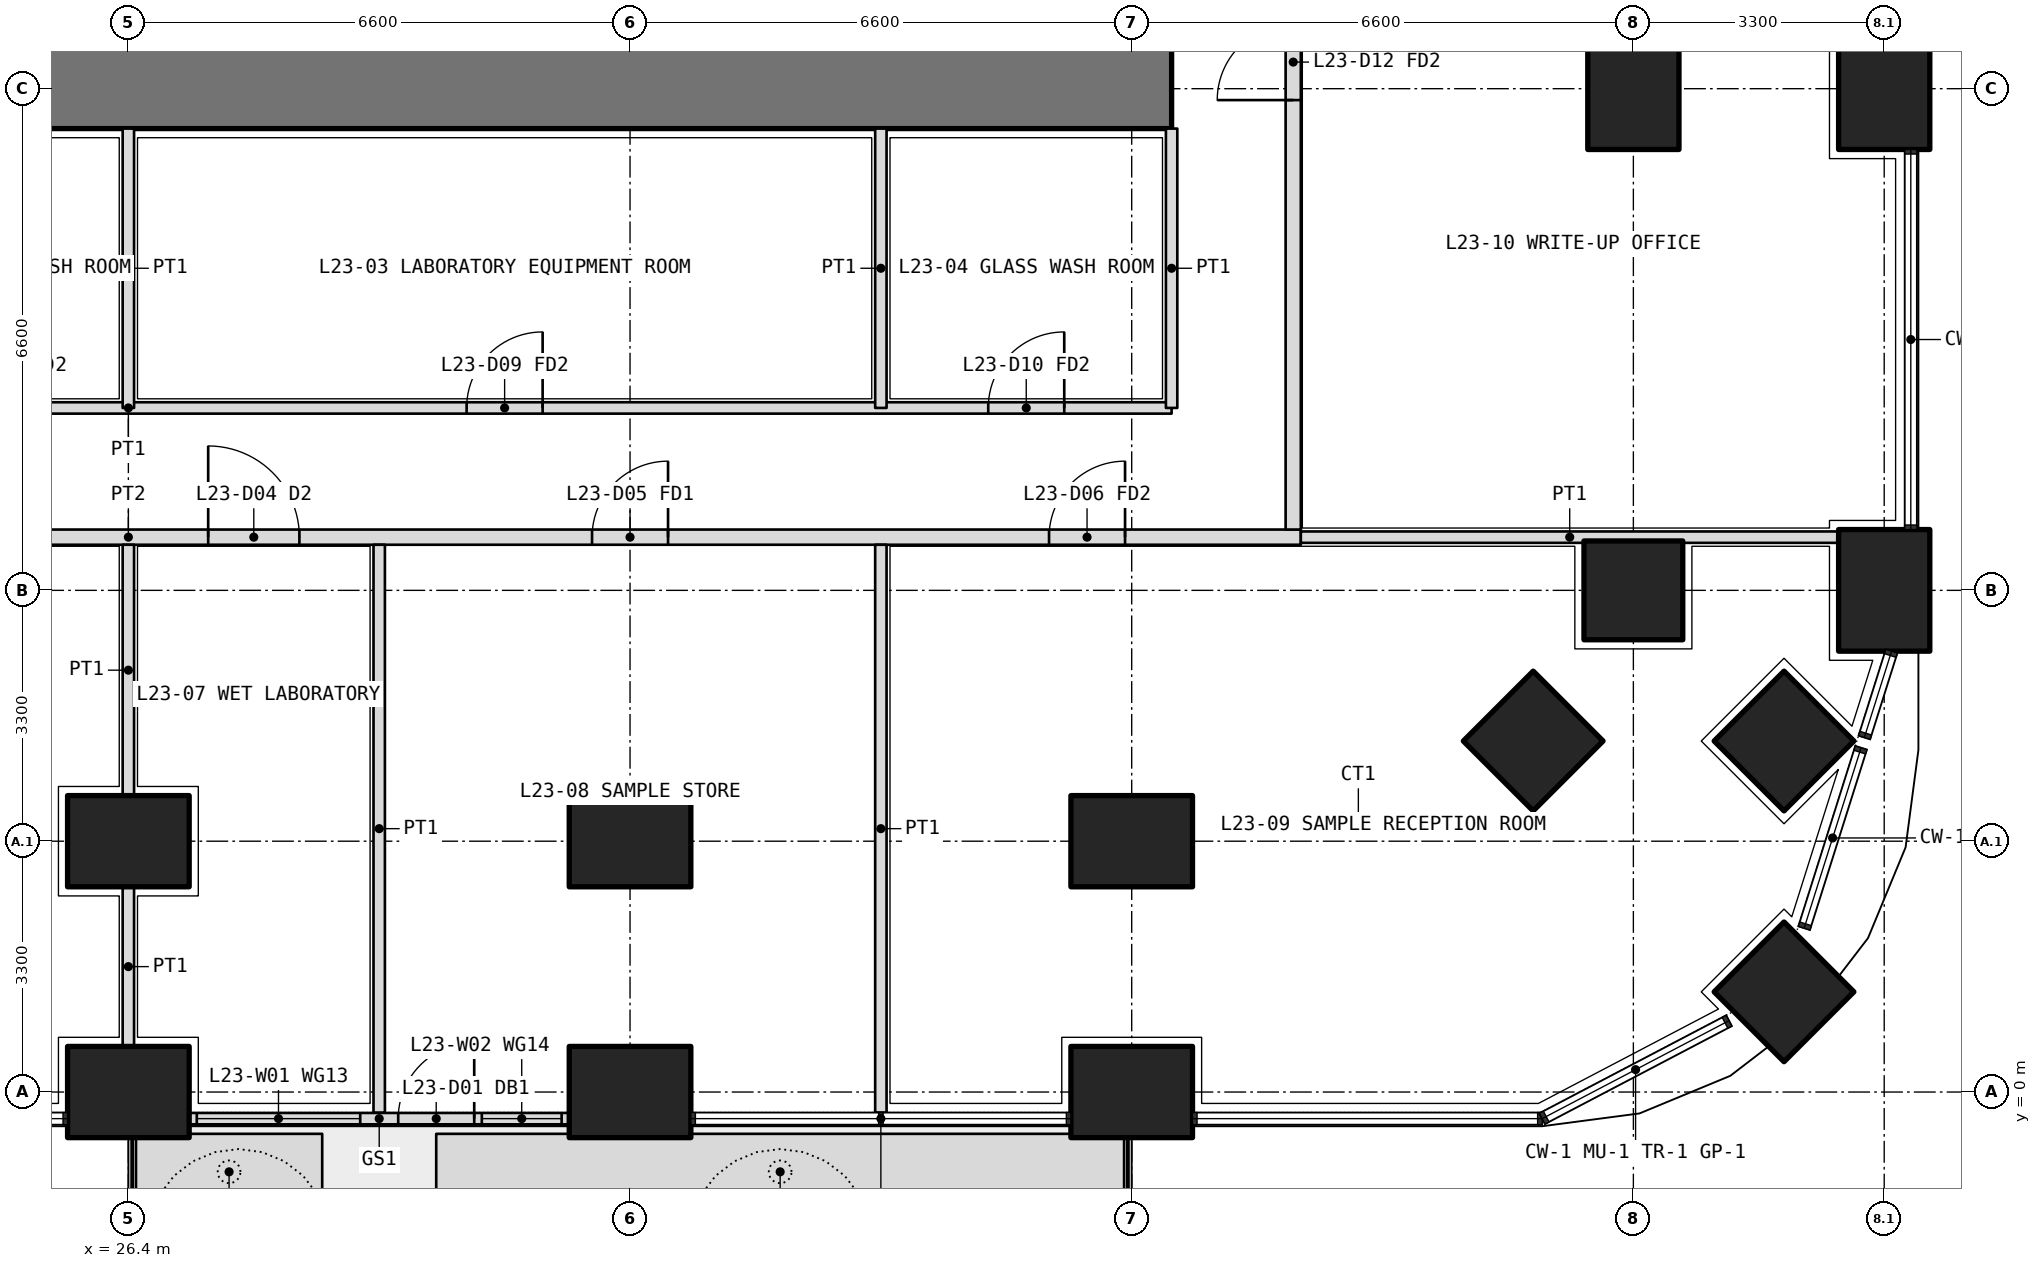
"""IFC4 building model, lengths in metres.
Left out: names, types, materials, properties, quantities, classifications, styles, units other than length and angle.
Written with IfcOpenShell. Run it as: python <this file> out.ifc"""

import sys

from ifc_helpers import new_model, si_unit, direction, frame, frame_2d, origin, origin_2d, place, context, subcontext, project, spatial, polyline, rectangle, outline, extrude, element, fill, save


model = new_model("IFC4")
c1 = context("Model", 3, precision=1e-05, world=origin(), true_north=direction((0.0, 1.0)))
c2 = subcontext(c1, "Body", "Model", "MODEL_VIEW")
j1 = project(units=[si_unit("LENGTHUNIT", "METRE"), si_unit("PLANEANGLEUNIT", "RADIAN")], contexts=[c1])
p1 = place(None, origin())
s1 = spatial("IfcSite", under=j1, at=p1, CompositionType="ELEMENT")
p2 = place(p1, origin())
s2 = spatial("IfcBuilding", under=s1, at=p2, CompositionType="ELEMENT")
p3 = place(p2, frame((0.0, 0.0, 103.2)))
s3 = spatial("IfcBuildingStorey", under=s2, at=p3, CompositionType="ELEMENT", Elevation=103.2)
p4 = place(p3, frame((48.182, 1.318, 0.0), z_axis=(0.0, 0.0, 1.0), x_axis=(0.707106781187, 0.707106781187, 0.0)))
e1 = element("IfcColumn", 1, at=p4, inside=s3, PredefinedType="COLUMN", context=c2, shape_type="SweptSolid", body=[
    extrude(rectangle(XDim=1.3, YDim=1.3, at=origin_2d()), origin(), (0.0, 0.0, 1.0), 4.2),
])
for number, where, z_axis, x_axis in (
    (2, (26.4, 0.0, 0.0), (0.0, 0.0, 1.0), (1.0, 0.0, 0.0)),
    (3, (33.0, 0.0, 0.0), (0.0, 0.0, 1.0), (1.0, 0.0, 0.0)),
    (4, (39.6, 0.0, 0.0), (0.0, 0.0, 1.0), (1.0, 0.0, 0.0)),
    (5, (49.5, 6.6, 0.0), (0.0, 0.0, 1.0), (0.0, 1.0, 0.0)),
    (6, (49.5, 13.2, 0.0), (0.0, 0.0, 1.0), (0.0, 1.0, 0.0)),
):
    element("IfcColumn", number, at=place(p3, frame(where, z_axis=z_axis, x_axis=x_axis)), inside=s3, PredefinedType="COLUMN", context=c2, shape_type="SweptSolid", body=[
        extrude(rectangle(XDim=1.6, YDim=1.2, at=origin_2d()), origin(), (0.0, 0.0, 1.0), 4.2),
    ])
for number, where, z_axis, x_axis in (
    (7, (46.2, 6.6, 0.0), (0.0, 0.0, 1.0), (1.0, 0.0, 0.0)),
    (8, (48.182, 4.618, 0.0), (0.0, 0.0, 1.0), (0.707, 0.707, 0.0)),
):
    element("IfcColumn", number, at=place(p3, frame(where, z_axis=z_axis, x_axis=x_axis)), inside=s3, PredefinedType="COLUMN", context=c2, shape_type="SweptSolid", body=[
        extrude(rectangle(XDim=1.3, YDim=1.3, at=origin_2d()), origin(), (0.0, 0.0, 1.0), 4.2),
    ])
for number, where, z_axis, x_axis in (
    (9, (26.4, 3.3, 0.0), (0.0, 0.0, 1.0), (1.0, 0.0, 0.0)),
    (10, (33.0, 3.3, 0.0), (0.0, 0.0, 1.0), (1.0, 0.0, 0.0)),
    (11, (39.6, 3.3, 0.0), (0.0, 0.0, 1.0), (1.0, 0.0, 0.0)),
):
    element("IfcColumn", number, at=place(p3, frame(where, z_axis=z_axis, x_axis=x_axis)), inside=s3, PredefinedType="COLUMN", context=c2, shape_type="SweptSolid", body=[
        extrude(rectangle(XDim=1.6, YDim=1.2, at=origin_2d()), origin(), (0.0, 0.0, 1.0), 4.2),
    ])
p5 = place(p3, frame((44.882, 4.618, 0.0), z_axis=(0.0, 0.0, 1.0), x_axis=(0.707106781187, 0.707106781187, 0.0)))
e12 = element("IfcColumn", 12, at=p5, inside=s3, PredefinedType="COLUMN", context=c2, shape_type="SweptSolid", body=[
    extrude(rectangle(XDim=1.3, YDim=1.3, at=origin_2d()), origin(), (0.0, 0.0, 1.0), 4.2),
])
p6 = place(p3, frame((46.2, 13.2, 0.0), z_axis=(0.0, 0.0, 1.0), x_axis=(0.0, 1.0, 0.0)))
e13 = element("IfcColumn", 13, at=p6, inside=s3, PredefinedType="COLUMN", context=c2, shape_type="SweptSolid", body=[
    extrude(rectangle(XDim=1.6, YDim=1.2, at=origin_2d()), origin(), (0.0, 0.0, 1.0), 4.2),
])
p7 = place(p3, origin())
e14 = element("IfcWall", 14, at=p7, inside=s3, PredefinedType="USERDEFINED", context=c2, shape_type="SweptSolid", body=[
    extrude(outline(polyline([(26.5, -1.55), (28.95, -1.55), (28.95, -0.55), (26.5, -0.55), (26.5, -1.55)]), holes=[polyline([(26.65, -1.4), (28.8, -1.4), (28.8, -0.7), (26.65, -0.7), (26.65, -1.4)])]), origin(), (0.0, 0.0, 1.0), 1.05),
])
p8 = place(p3, origin())
e15 = element("IfcWall", 15, at=p8, inside=s3, PredefinedType="USERDEFINED", context=c2, shape_type="SweptSolid", body=[
    extrude(outline(polyline([(30.45, -1.55), (39.5, -1.55), (39.5, -0.55), (30.45, -0.55), (30.45, -1.55)]), holes=[polyline([(30.6, -1.4), (39.35, -1.4), (39.35, -0.7), (30.6, -0.7), (30.6, -1.4)])]), origin(), (0.0, 0.0, 1.0), 1.05),
])
p9 = place(p3, frame((27.2, -0.35, 0.0), z_axis=(0.0, 0.0, 1.0), x_axis=(1.0, 0.0, 0.0)))
e16 = element("IfcWall", 16, at=p9, inside=s3, PredefinedType="SOLIDWALL", context=c2, shape_type="SweptSolid", body=[
    extrude(rectangle(XDim=5.0, YDim=0.15, at=frame_2d((2.5, 0.0))), origin(), (0.0, 0.0, 1.0), 2.7),
])
p10 = place(p9, frame((2.75, 0.0, 0.0)))
e17 = element("IfcOpeningElement", 17, at=p10, cuts=e16, PredefinedType="OPENING", context=c2, shape_type="SweptSolid", body=[
    extrude(rectangle(XDim=1.0, YDim=2.4, at=frame_2d((0.5, 1.2))), frame((0.0, 0.085, 0.0), z_axis=(0.0, -1.0, 0.0), x_axis=(1.0, 0.0, 0.0)), (0.0, 0.0, 1.0), 0.17),
])
p11 = place(p9, frame((0.1, 0.0, 0.1)))
e18 = element("IfcOpeningElement", 18, at=p11, cuts=e16, PredefinedType="OPENING", context=c2, shape_type="SweptSolid", body=[
    extrude(rectangle(XDim=2.15, YDim=2.3, at=frame_2d((1.075, 1.15))), frame((0.0, 0.085, 0.0), z_axis=(0.0, -1.0, 0.0), x_axis=(1.0, 0.0, 0.0)), (0.0, 0.0, 1.0), 0.17),
])
p12 = place(p9, frame((3.85, 0.0, 0.1)))
e19 = element("IfcOpeningElement", 19, at=p12, cuts=e16, PredefinedType="OPENING", context=c2, shape_type="SweptSolid", body=[
    extrude(rectangle(XDim=1.05, YDim=2.3, at=frame_2d((0.525, 1.15))), frame((0.0, 0.085, 0.0), z_axis=(0.0, -1.0, 0.0), x_axis=(1.0, 0.0, 0.0)), (0.0, 0.0, 1.0), 0.17),
])
p13 = place(p3, frame((12.675, 13.2, 0.0), z_axis=(0.0, 0.0, 1.0), x_axis=(1.0, 0.0, 0.0)))
e20 = element("IfcWall", 20, at=p13, inside=s3, PredefinedType="SHEAR", context=c2, shape_type="SweptSolid", body=[
    extrude(rectangle(XDim=27.45, YDim=1.05, at=frame_2d((13.725, 0.0))), origin(), (0.0, 0.0, 1.0), 4.2),
])
p14 = place(p3, frame((12.675, 9.0, 0.0), z_axis=(0.0, 0.0, 1.0), x_axis=(1.0, 0.0, 0.0)))
e21 = element("IfcWall", 21, at=p14, inside=s3, PredefinedType="PARTITIONING", context=c2, shape_type="SweptSolid", body=[
    extrude(rectangle(XDim=27.45, YDim=0.15, at=frame_2d((13.725, 0.0))), origin(), (0.0, 0.0, 1.0), 2.85),
])
p15 = place(p14, frame((4.712, 0.0, 0.0)))
e22 = element("IfcOpeningElement", 22, at=p15, cuts=e21, PredefinedType="OPENING", context=c2, shape_type="SweptSolid", body=[
    extrude(rectangle(XDim=1.0, YDim=2.1, at=frame_2d((0.5, 1.05))), frame((0.0, 0.085, 0.0), z_axis=(0.0, -1.0, 0.0), x_axis=(1.0, 0.0, 0.0)), (0.0, 0.0, 1.0), 0.17),
])
p16 = place(p14, frame((11.575, 0.0, 0.0)))
e23 = element("IfcOpeningElement", 23, at=p16, cuts=e21, PredefinedType="OPENING", context=c2, shape_type="SweptSolid", body=[
    extrude(rectangle(XDim=1.0, YDim=2.1, at=frame_2d((0.5, 1.05))), frame((0.0, 0.085, 0.0), z_axis=(0.0, -1.0, 0.0), x_axis=(1.0, 0.0, 0.0)), (0.0, 0.0, 1.0), 0.17),
])
p17 = place(p14, frame((18.175, 0.0, 0.0)))
e24 = element("IfcOpeningElement", 24, at=p17, cuts=e21, PredefinedType="OPENING", context=c2, shape_type="SweptSolid", body=[
    extrude(rectangle(XDim=1.0, YDim=2.1, at=frame_2d((0.5, 1.05))), frame((0.0, 0.085, 0.0), z_axis=(0.0, -1.0, 0.0), x_axis=(1.0, 0.0, 0.0)), (0.0, 0.0, 1.0), 0.17),
])
p18 = place(p14, frame((25.038, 0.0, 0.0)))
e25 = element("IfcOpeningElement", 25, at=p18, cuts=e21, PredefinedType="OPENING", context=c2, shape_type="SweptSolid", body=[
    extrude(rectangle(XDim=1.0, YDim=2.1, at=frame_2d((0.5, 1.05))), frame((0.0, 0.085, 0.0), z_axis=(0.0, -1.0, 0.0), x_axis=(1.0, 0.0, 0.0)), (0.0, 0.0, 1.0), 0.17),
])
for number, where, z_axis, x_axis in (
    (26, (40.125, 12.675, 0.0), (0.0, 0.0, 1.0), (0.0, -1.0, 0.0)),
    (27, (26.4, 12.675, 0.0), (0.0, 0.0, 1.0), (0.0, -1.0, 0.0)),
):
    element("IfcWall", number, at=place(p3, frame(where, z_axis=z_axis, x_axis=x_axis)), inside=s3, PredefinedType="PARTITIONING", context=c2, shape_type="SweptSolid", body=[
        extrude(rectangle(XDim=3.675, YDim=0.15, at=frame_2d((1.837, 0.0))), origin(), (0.0, 0.0, 1.0), 2.85),
    ])
p19 = place(p3, frame((36.3, 12.675, 0.0), z_axis=(0.0, 0.0, 1.0), x_axis=(0.0, -1.0, 0.0)))
e28 = element("IfcWall", 28, at=p19, inside=s3, PredefinedType="PARTITIONING", context=c2, shape_type="SweptSolid", body=[
    extrude(rectangle(XDim=3.675, YDim=0.15, at=frame_2d((1.837, 0.0))), origin(), (0.0, 0.0, 1.0), 3.9),
])
p20 = place(p3, frame((10.975, 7.3, 0.0), z_axis=(0.0, 0.0, 1.0), x_axis=(1.0, 0.0, 0.0)))
e29 = element("IfcWall", 29, at=p20, inside=s3, PredefinedType="PARTITIONING", context=c2, shape_type="SweptSolid", body=[
    extrude(rectangle(XDim=30.85, YDim=0.2, at=frame_2d((15.425, 0.0))), origin(), (0.0, 0.0, 1.0), 2.85),
])
p21 = place(p20, frame((0.562, 0.0, 0.0)))
e30 = element("IfcOpeningElement", 30, at=p21, cuts=e29, PredefinedType="OPENING", context=c2, shape_type="SweptSolid", body=[
    extrude(rectangle(XDim=1.2, YDim=2.1, at=frame_2d((0.6, 1.05))), frame((0.0, 0.11, 0.0), z_axis=(0.0, -1.0, 0.0), x_axis=(1.0, 0.0, 0.0)), (0.0, 0.0, 1.0), 0.22),
])
p22 = place(p20, frame((8.325, 0.0, 0.0)))
e31 = element("IfcOpeningElement", 31, at=p22, cuts=e29, PredefinedType="OPENING", context=c2, shape_type="SweptSolid", body=[
    extrude(rectangle(XDim=1.0, YDim=2.1, at=frame_2d((0.5, 1.05))), frame((0.0, 0.11, 0.0), z_axis=(0.0, -1.0, 0.0), x_axis=(1.0, 0.0, 0.0)), (0.0, 0.0, 1.0), 0.22),
])
p23 = place(p20, frame((16.475, 0.0, 0.0)))
e32 = element("IfcOpeningElement", 32, at=p23, cuts=e29, PredefinedType="OPENING", context=c2, shape_type="SweptSolid", body=[
    extrude(rectangle(XDim=1.2, YDim=2.1, at=frame_2d((0.6, 1.05))), frame((0.0, 0.11, 0.0), z_axis=(0.0, -1.0, 0.0), x_axis=(1.0, 0.0, 0.0)), (0.0, 0.0, 1.0), 0.22),
])
p24 = place(p20, frame((21.525, 0.0, 0.0)))
e33 = element("IfcOpeningElement", 33, at=p24, cuts=e29, PredefinedType="OPENING", context=c2, shape_type="SweptSolid", body=[
    extrude(rectangle(XDim=1.0, YDim=2.1, at=frame_2d((0.5, 1.05))), frame((0.0, 0.11, 0.0), z_axis=(0.0, -1.0, 0.0), x_axis=(1.0, 0.0, 0.0)), (0.0, 0.0, 1.0), 0.22),
])
p25 = place(p20, frame((27.538, 0.0, 0.0)))
e34 = element("IfcOpeningElement", 34, at=p25, cuts=e29, PredefinedType="OPENING", context=c2, shape_type="SweptSolid", body=[
    extrude(rectangle(XDim=1.0, YDim=2.1, at=frame_2d((0.5, 1.05))), frame((0.0, 0.11, 0.0), z_axis=(0.0, -1.0, 0.0), x_axis=(1.0, 0.0, 0.0)), (0.0, 0.0, 1.0), 0.22),
])
p26 = place(p3, frame((41.725, 7.4, 0.0), z_axis=(0.0, 0.0, 1.0), x_axis=(0.0, 1.0, 0.0)))
e35 = element("IfcWall", 35, at=p26, inside=s3, PredefinedType="PARTITIONING", context=c2, shape_type="SweptSolid", body=[
    extrude(rectangle(XDim=27.625, YDim=0.2, at=frame_2d((13.812, 0.0))), origin(), (0.0, 0.0, 1.0), 2.85),
])
p27 = place(p26, frame((5.65, 0.0, 0.0)))
e36 = element("IfcOpeningElement", 36, at=p27, cuts=e35, PredefinedType="OPENING", context=c2, shape_type="SweptSolid", body=[
    extrude(rectangle(XDim=1.0, YDim=2.1, at=frame_2d((0.5, 1.05))), frame((0.0, 0.11, 0.0), z_axis=(0.0, -1.0, 0.0), x_axis=(1.0, 0.0, 0.0)), (0.0, 0.0, 1.0), 0.22),
])
p28 = place(p26, frame((13.5, 0.0, 0.0)))
e37 = element("IfcOpeningElement", 37, at=p28, cuts=e35, PredefinedType="OPENING", context=c2, shape_type="SweptSolid", body=[
    extrude(rectangle(XDim=1.0, YDim=2.1, at=frame_2d((0.5, 1.05))), frame((0.0, 0.11, 0.0), z_axis=(0.0, -1.0, 0.0), x_axis=(1.0, 0.0, 0.0)), (0.0, 0.0, 1.0), 0.22),
])
p29 = place(p26, frame((16.85, 0.0, 0.0)))
e38 = element("IfcOpeningElement", 38, at=p29, cuts=e35, PredefinedType="OPENING", context=c2, shape_type="SweptSolid", body=[
    extrude(rectangle(XDim=0.9, YDim=2.1, at=frame_2d((0.45, 1.05))), frame((0.0, 0.11, 0.0), z_axis=(0.0, -1.0, 0.0), x_axis=(1.0, 0.0, 0.0)), (0.0, 0.0, 1.0), 0.22),
])
p30 = place(p26, frame((20.15, 0.0, 0.0)))
e39 = element("IfcOpeningElement", 39, at=p30, cuts=e35, PredefinedType="OPENING", context=c2, shape_type="SweptSolid", body=[
    extrude(rectangle(XDim=1.0, YDim=2.1, at=frame_2d((0.5, 1.05))), frame((0.0, 0.11, 0.0), z_axis=(0.0, -1.0, 0.0), x_axis=(1.0, 0.0, 0.0)), (0.0, 0.0, 1.0), 0.22),
])
p31 = place(p26, frame((24.512, 0.0, 0.0)))
e40 = element("IfcOpeningElement", 40, at=p31, cuts=e35, PredefinedType="OPENING", context=c2, shape_type="SweptSolid", body=[
    extrude(rectangle(XDim=1.0, YDim=2.1, at=frame_2d((0.5, 1.05))), frame((0.0, 0.11, 0.0), z_axis=(0.0, -1.0, 0.0), x_axis=(1.0, 0.0, 0.0)), (0.0, 0.0, 1.0), 0.22),
])
p32 = place(p3, frame((48.9, 7.3, 0.0), z_axis=(0.0, 0.0, 1.0), x_axis=(-1.0, 0.0, 0.0)))
e41 = element("IfcWall", 41, at=p32, inside=s3, PredefinedType="PARTITIONING", context=c2, shape_type="SweptSolid", body=[
    extrude(rectangle(XDim=7.075, YDim=0.15, at=frame_2d((3.538, 0.0))), origin(), (0.0, 0.0, 1.0), 2.85),
])
p33 = place(p3, frame((26.4, 0.6, 0.0), z_axis=(0.0, 0.0, 1.0), x_axis=(0.0, 1.0, 0.0)))
e42 = element("IfcWall", 42, at=p33, inside=s3, PredefinedType="PARTITIONING", context=c2, shape_type="SweptSolid", body=[
    extrude(rectangle(XDim=2.1, YDim=0.15, at=frame_2d((1.05, 0.0))), origin(), (0.0, 0.0, 1.0), 2.85),
])
p34 = place(p3, frame((26.4, 3.9, 0.0), z_axis=(0.0, 0.0, 1.0), x_axis=(0.0, 1.0, 0.0)))
e43 = element("IfcWall", 43, at=p34, inside=s3, PredefinedType="PARTITIONING", context=c2, shape_type="SweptSolid", body=[
    extrude(rectangle(XDim=3.3, YDim=0.15, at=frame_2d((1.65, 0.0))), origin(), (0.0, 0.0, 1.0), 2.85),
])
for number, where, z_axis, x_axis in (
    (44, (29.7, -0.27, 0.0), (0.0, 0.0, 1.0), (0.0, 1.0, 0.0)),
    (45, (36.3, -0.27, 0.0), (0.0, 0.0, 1.0), (0.0, 1.0, 0.0)),
):
    element("IfcWall", number, at=place(p3, frame(where, z_axis=z_axis, x_axis=x_axis)), inside=s3, PredefinedType="PARTITIONING", context=c2, shape_type="SweptSolid", body=[
        extrude(rectangle(XDim=7.47, YDim=0.15, at=frame_2d((3.735, 0.0))), origin(), (0.0, 0.0, 1.0), 2.7),
    ])
p35 = place(p10, origin())
e46 = element("IfcDoor", 46, at=p35, inside=s3, OperationType="SINGLE_SWING_RIGHT", PredefinedType="DOOR", context=c2, shape_type="SweptSolid", body=[
    extrude(rectangle(XDim=1.0, YDim=2.4, at=frame_2d((0.5, 1.2))), frame((0.0, 0.025, 0.0), z_axis=(0.0, -1.0, 0.0), x_axis=(1.0, 0.0, 0.0)), (0.0, 0.0, 1.0), 0.05),
])
fill(e17, e46)
p36 = place(p11, origin())
e47 = element("IfcWindow", 47, at=p36, inside=s3, PartitioningType="SINGLE_PANEL", PredefinedType="WINDOW", context=c2, shape_type="SweptSolid", body=[
    extrude(rectangle(XDim=2.15, YDim=2.3, at=frame_2d((1.075, 1.15))), frame((0.0, 0.03, 0.0), z_axis=(0.0, -1.0, 0.0), x_axis=(1.0, 0.0, 0.0)), (0.0, 0.0, 1.0), 0.06),
])
fill(e18, e47)
p37 = place(p12, origin())
e48 = element("IfcWindow", 48, at=p37, inside=s3, PartitioningType="SINGLE_PANEL", PredefinedType="WINDOW", context=c2, shape_type="SweptSolid", body=[
    extrude(rectangle(XDim=1.05, YDim=2.3, at=frame_2d((0.525, 1.15))), frame((0.0, 0.03, 0.0), z_axis=(0.0, -1.0, 0.0), x_axis=(1.0, 0.0, 0.0)), (0.0, 0.0, 1.0), 0.06),
])
fill(e19, e48)
p38 = place(p17, origin())
e49 = element("IfcDoor", 49, at=p38, inside=s3, OperationType="SINGLE_SWING_RIGHT", PredefinedType="DOOR", context=c2, shape_type="SweptSolid", body=[
    extrude(rectangle(XDim=1.0, YDim=2.1, at=frame_2d((0.5, 1.05))), frame((0.0, 0.025, 0.0), z_axis=(0.0, -1.0, 0.0), x_axis=(1.0, 0.0, 0.0)), (0.0, 0.0, 1.0), 0.05),
])
fill(e24, e49)
p39 = place(p18, origin())
e50 = element("IfcDoor", 50, at=p39, inside=s3, OperationType="SINGLE_SWING_RIGHT", PredefinedType="DOOR", context=c2, shape_type="SweptSolid", body=[
    extrude(rectangle(XDim=1.0, YDim=2.1, at=frame_2d((0.5, 1.05))), frame((0.0, 0.025, 0.0), z_axis=(0.0, -1.0, 0.0), x_axis=(1.0, 0.0, 0.0)), (0.0, 0.0, 1.0), 0.05),
])
fill(e25, e50)
p40 = place(p23, origin())
e51 = element("IfcDoor", 51, at=p40, inside=s3, OperationType="DOUBLE_DOOR_SINGLE_SWING", PredefinedType="DOOR", context=c2, shape_type="SweptSolid", body=[
    extrude(rectangle(XDim=1.2, YDim=2.1, at=frame_2d((0.6, 1.05))), frame((0.0, 0.025, 0.0), z_axis=(0.0, -1.0, 0.0), x_axis=(1.0, 0.0, 0.0)), (0.0, 0.0, 1.0), 0.05),
])
fill(e32, e51)
p41 = place(p24, origin())
e52 = element("IfcDoor", 52, at=p41, inside=s3, OperationType="SINGLE_SWING_RIGHT", PredefinedType="DOOR", context=c2, shape_type="SweptSolid", body=[
    extrude(rectangle(XDim=1.0, YDim=2.1, at=frame_2d((0.5, 1.05))), frame((0.0, 0.025, 0.0), z_axis=(0.0, -1.0, 0.0), x_axis=(1.0, 0.0, 0.0)), (0.0, 0.0, 1.0), 0.05),
])
fill(e33, e52)
p42 = place(p25, origin())
e53 = element("IfcDoor", 53, at=p42, inside=s3, OperationType="SINGLE_SWING_RIGHT", PredefinedType="DOOR", context=c2, shape_type="SweptSolid", body=[
    extrude(rectangle(XDim=1.0, YDim=2.1, at=frame_2d((0.5, 1.05))), frame((0.0, 0.025, 0.0), z_axis=(0.0, -1.0, 0.0), x_axis=(1.0, 0.0, 0.0)), (0.0, 0.0, 1.0), 0.05),
])
fill(e34, e53)
p43 = place(p27, origin())
e54 = element("IfcDoor", 54, at=p43, inside=s3, OperationType="SINGLE_SWING_LEFT", PredefinedType="DOOR", context=c2, shape_type="SweptSolid", body=[
    extrude(rectangle(XDim=1.0, YDim=2.1, at=frame_2d((0.5, 1.05))), frame((0.0, 0.025, 0.0), z_axis=(0.0, -1.0, 0.0), x_axis=(1.0, 0.0, 0.0)), (0.0, 0.0, 1.0), 0.05),
])
fill(e36, e54)
save(model, sys.argv[1])
